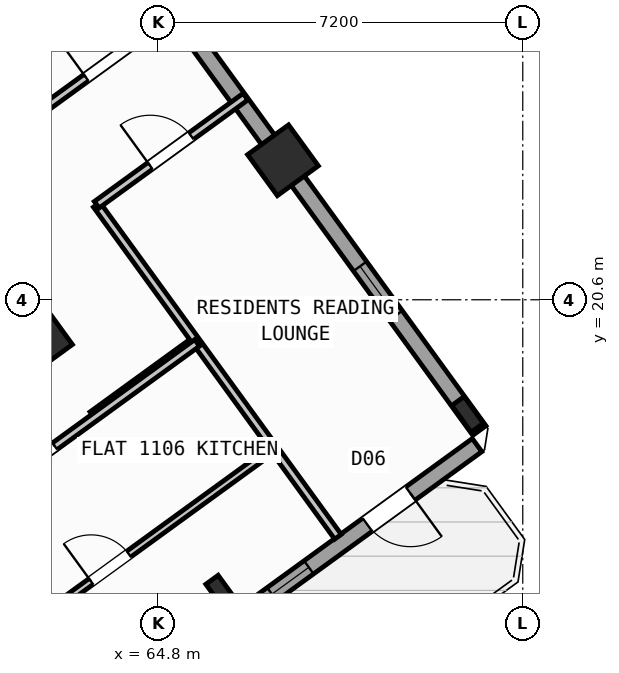
"""IFC4 building model, lengths in metres.
Left out: names, types, materials, properties, quantities, classifications, styles, units other than length and angle.
Written with IfcOpenShell. Run it as: python <this file> out.ifc"""

import sys

from ifc_helpers import new_model, si_unit, direction, frame, frame_2d, origin, origin_2d, place, context, subcontext, project, spatial, rectangle, hollow_rectangle, i_section, extrude, source, transform, mapped, element, fill, save


model = new_model("IFC4")
c1 = context("Model", 3, precision=1e-05, world=origin(), true_north=direction((0.0, 1.0)))
c2 = subcontext(c1, "Body", "Model", "MODEL_VIEW")
j1 = project(units=[si_unit("LENGTHUNIT", "METRE"), si_unit("PLANEANGLEUNIT", "RADIAN")], contexts=[c1])
p1 = place(None, origin())
s1 = spatial("IfcSite", under=j1, at=p1, CompositionType="ELEMENT")
p2 = place(p1, origin())
s2 = spatial("IfcBuilding", under=s1, at=p2, CompositionType="ELEMENT")
p3 = place(p2, frame((0.0, 0.0, 45.6)))
s3 = spatial("IfcBuildingStorey", under=s2, at=p3, CompositionType="ELEMENT", Elevation=45.6)
m1 = source(origin(), c2, "Body", "SweptSolid", [
    extrude(i_section(OverallWidth=0.3, OverallDepth=0.65, WebThickness=0.016, FlangeThickness=0.031, at=origin_2d()), origin(), (0.0, 0.0, 1.0), 3.6),
])
p4 = place(p3, frame((66.058, 14.811, 0.0), z_axis=(0.0, 0.0, 1.0), x_axis=(0.809016994375, 0.587785252292, 0.0)))
e1 = element("IfcColumn", 1, at=p4, inside=s3, PredefinedType="COLUMN", context=c2, shape_type="MappedRepresentation", body=[
    mapped(m1, transform((0.0, 0.0, 0.0), scale=1.0)),
])
m2 = source(origin(), c2, "Body", "SweptSolid", [
    extrude(hollow_rectangle(XDim=1.0, YDim=1.0, WallThickness=0.04, at=origin_2d()), origin(), (0.0, 0.0, 1.0), 3.6),
])
p5 = place(p3, frame((62.414, 19.827, 0.0), z_axis=(0.0, 0.0, 1.0), x_axis=(0.809016994375, 0.587785252292, 0.0)))
e2 = element("IfcColumn", 2, at=p5, inside=s3, PredefinedType="COLUMN", context=c2, shape_type="MappedRepresentation", body=[
    mapped(m2, transform((0.0, 0.0, 0.0), scale=1.0)),
])
p6 = place(p3, frame((70.912, 18.338, 0.0), z_axis=(0.0, 0.0, 1.0), x_axis=(0.809016994375, 0.587785252292, 0.0)))
e3 = element("IfcColumn", 3, at=p6, inside=s3, PredefinedType="COLUMN", context=c2, shape_type="MappedRepresentation", body=[
    mapped(m1, transform((0.0, 0.0, 0.0), scale=1.0)),
])
p7 = place(p3, frame((67.268, 23.354, 0.0), z_axis=(0.0, 0.0, 1.0), x_axis=(0.809016994375, 0.587785252292, 0.0)))
e4 = element("IfcColumn", 4, at=p7, inside=s3, PredefinedType="COLUMN", context=c2, shape_type="MappedRepresentation", body=[
    mapped(m2, transform((0.0, 0.0, 0.0), scale=1.0)),
])
p8 = place(p3, frame((58.455, 35.484, 0.0), z_axis=(0.0, 0.0, 1.0), x_axis=(0.587783625747, -0.809018176127, 0.0)))
e5 = element("IfcWall", 5, at=p8, inside=s3, PredefinedType="STANDARD", context=c2, shape_type="SweptSolid", body=[
    extrude(rectangle(XDim=21.587, YDim=0.32, at=frame_2d((10.794, 0.0))), origin(), (0.0, 0.0, 1.0), 2.725),
])
p9 = place(p8, frame((1.5, 0.0, 0.8)))
e6 = element("IfcOpeningElement", 6, at=p9, cuts=e5, PredefinedType="OPENING", context=c2, shape_type="SweptSolid", body=[
    extrude(rectangle(XDim=2.1, YDim=1.55, at=frame_2d((1.05, 0.775))), frame((0.0, 0.17, 0.0), z_axis=(0.0, -1.0, 0.0), x_axis=(1.0, 0.0, 0.0)), (0.0, 0.0, 1.0), 0.34),
])
p10 = place(p8, frame((5.105, 0.0, 0.85)))
e7 = element("IfcOpeningElement", 7, at=p10, cuts=e5, PredefinedType="OPENING", context=c2, shape_type="SweptSolid", body=[
    extrude(rectangle(XDim=1.5, YDim=1.5, at=frame_2d((0.75, 0.75))), frame((0.0, 0.17, 0.0), z_axis=(0.0, -1.0, 0.0), x_axis=(1.0, 0.0, 0.0)), (0.0, 0.0, 1.0), 0.34),
])
p11 = place(p8, frame((8.954, 0.0, 0.85)))
e8 = element("IfcOpeningElement", 8, at=p11, cuts=e5, PredefinedType="OPENING", context=c2, shape_type="SweptSolid", body=[
    extrude(rectangle(XDim=1.5, YDim=1.5, at=frame_2d((0.75, 0.75))), frame((0.0, 0.17, 0.0), z_axis=(0.0, -1.0, 0.0), x_axis=(1.0, 0.0, 0.0)), (0.0, 0.0, 1.0), 0.34),
])
p12 = place(p8, frame((17.581, 0.0, 0.95)))
e9 = element("IfcOpeningElement", 9, at=p12, cuts=e5, PredefinedType="OPENING", context=c2, shape_type="SweptSolid", body=[
    extrude(rectangle(XDim=1.2, YDim=1.4, at=frame_2d((0.6, 0.7))), frame((0.0, 0.17, 0.0), z_axis=(0.0, -1.0, 0.0), x_axis=(1.0, 0.0, 0.0)), (0.0, 0.0, 1.0), 0.34),
])
p13 = place(p3, frame((71.098, 17.731, 0.0), z_axis=(0.0, 0.0, 1.0), x_axis=(-0.809021120468, -0.587779573171, 0.0)))
e10 = element("IfcWall", 10, at=p13, inside=s3, PredefinedType="STANDARD", context=c2, shape_type="SweptSolid", body=[
    extrude(rectangle(XDim=17.588, YDim=0.32, at=frame_2d((8.794, 0.0))), origin(), (0.0, 0.0, 1.0), 3.35),
])
p14 = place(p13, frame((1.624, 0.0, 0.0)))
e11 = element("IfcOpeningElement", 11, at=p14, cuts=e10, PredefinedType="OPENING", context=c2, shape_type="SweptSolid", body=[
    extrude(rectangle(XDim=1.05, YDim=2.15, at=frame_2d((0.525, 1.075))), frame((0.0, 0.17, 0.0), z_axis=(0.0, -1.0, 0.0), x_axis=(1.0, 0.0, 0.0)), (0.0, 0.0, 1.0), 0.34),
])
p15 = place(p13, frame((4.104, 0.0, 1.0)))
e12 = element("IfcOpeningElement", 12, at=p15, cuts=e10, PredefinedType="OPENING", context=c2, shape_type="SweptSolid", body=[
    extrude(rectangle(XDim=0.9, YDim=1.25, at=frame_2d((0.45, 0.625))), frame((0.0, 0.17, 0.0), z_axis=(0.0, -1.0, 0.0), x_axis=(1.0, 0.0, 0.0)), (0.0, 0.0, 1.0), 0.34),
])
p16 = place(p13, frame((7.879, 0.0, 0.85)))
e13 = element("IfcOpeningElement", 13, at=p16, cuts=e10, PredefinedType="OPENING", context=c2, shape_type="SweptSolid", body=[
    extrude(rectangle(XDim=1.8, YDim=1.5, at=frame_2d((0.9, 0.75))), frame((0.0, 0.17, 0.0), z_axis=(0.0, -1.0, 0.0), x_axis=(1.0, 0.0, 0.0)), (0.0, 0.0, 1.0), 0.34),
])
p17 = place(p13, frame((12.849, 0.0, 0.85)))
e14 = element("IfcOpeningElement", 14, at=p17, cuts=e10, PredefinedType="OPENING", context=c2, shape_type="SweptSolid", body=[
    extrude(rectangle(XDim=1.8, YDim=1.5, at=frame_2d((0.9, 0.75))), frame((0.0, 0.17, 0.0), z_axis=(0.0, -1.0, 0.0), x_axis=(1.0, 0.0, 0.0)), (0.0, 0.0, 1.0), 0.34),
])
p18 = place(p3, frame((63.507, 18.322, 0.0), z_axis=(0.0, 0.0, 1.0), x_axis=(0.809034604122, 0.587761013791, 0.0)))
e15 = element("IfcWall", 15, at=p18, inside=s3, PredefinedType="PARTITIONING", context=c2, shape_type="SweptSolid", body=[
    extrude(rectangle(XDim=2.51, YDim=0.16, at=frame_2d((1.255, 0.0))), origin(), (0.0, 0.0, 1.0), 3.34),
])
p19 = place(p3, frame((68.353, 15.922, 0.0), z_axis=(0.0, 0.0, 1.0), x_axis=(-0.58776839458, 0.809029241952, 0.0)))
e16 = element("IfcWall", 16, at=p19, inside=s3, PredefinedType="PARTITIONING", context=c2, shape_type="SweptSolid", body=[
    extrude(rectangle(XDim=8.1, YDim=0.16, at=frame_2d((4.05, 0.0))), origin(), (0.0, 0.0, 1.0), 3.34),
])
p20 = place(p3, frame((63.592, 22.475, 0.0), z_axis=(0.0, 0.0, 1.0), x_axis=(0.809035546126, 0.58775971715, 0.0)))
e17 = element("IfcWall", 17, at=p20, inside=s3, PredefinedType="PARTITIONING", context=c2, shape_type="SweptSolid", body=[
    extrude(rectangle(XDim=3.63, YDim=0.16, at=frame_2d((1.815, 0.0))), origin(), (0.0, 0.0, 1.0), 3.34),
])
p21 = place(p20, frame((1.305, 0.0, 0.0)))
e18 = element("IfcOpeningElement", 18, at=p21, cuts=e17, PredefinedType="OPENING", context=c2, shape_type="SweptSolid", body=[
    extrude(rectangle(XDim=1.0, YDim=2.1, at=frame_2d((0.5, 1.05))), frame((0.0, 0.09, 0.0), z_axis=(0.0, -1.0, 0.0), x_axis=(1.0, 0.0, 0.0)), (0.0, 0.0, 1.0), 0.18),
])
p22 = place(p3, frame((62.328, 24.215, 0.0), z_axis=(0.0, 0.0, 1.0), x_axis=(0.809003564202, 0.587803736896, 0.0)))
e19 = element("IfcWall", 19, at=p22, inside=s3, PredefinedType="PARTITIONING", context=c2, shape_type="SweptSolid", body=[
    extrude(rectangle(XDim=3.63, YDim=0.16, at=frame_2d((1.815, 0.0))), origin(), (0.0, 0.0, 1.0), 3.34),
])
p23 = place(p22, frame((1.305, 0.0, 0.0)))
e20 = element("IfcOpeningElement", 20, at=p23, cuts=e19, PredefinedType="OPENING", context=c2, shape_type="SweptSolid", body=[
    extrude(rectangle(XDim=1.0, YDim=2.1, at=frame_2d((0.5, 1.05))), frame((0.0, 0.09, 0.0), z_axis=(0.0, -1.0, 0.0), x_axis=(1.0, 0.0, 0.0)), (0.0, 0.0, 1.0), 0.18),
])
p24 = place(p3, frame((53.705, 11.126, 0.0), z_axis=(0.0, 0.0, 1.0), x_axis=(0.809014504436, 0.587788679384, 0.0)))
e21 = element("IfcWall", 21, at=p24, inside=s3, PredefinedType="PARTITIONING", context=c2, shape_type="SweptSolid", body=[
    extrude(rectangle(XDim=14.67, YDim=0.16, at=frame_2d((7.335, 0.0))), origin(), (0.0, 0.0, 1.0), 3.34),
])
p25 = place(p24, frame((10.2, 0.0, 0.0)))
e22 = element("IfcOpeningElement", 22, at=p25, cuts=e21, PredefinedType="OPENING", context=c2, shape_type="SweptSolid", body=[
    extrude(rectangle(XDim=1.0, YDim=2.1, at=frame_2d((0.5, 1.05))), frame((0.0, 0.09, 0.0), z_axis=(0.0, -1.0, 0.0), x_axis=(1.0, 0.0, 0.0)), (0.0, 0.0, 1.0), 0.18),
])
p26 = place(p3, frame((56.249, 9.785, 0.0), z_axis=(0.0, 0.0, 1.0), x_axis=(0.809011747655, 0.587792473715, 0.0)))
e23 = element("IfcWall", 23, at=p26, inside=s3, PredefinedType="PLUMBINGWALL", context=c2, shape_type="SweptSolid", body=[
    extrude(rectangle(XDim=13.4, YDim=0.14, at=frame_2d((6.7, 0.0))), origin(), (0.0, 0.0, 1.0), 3.34),
])
p27 = place(p26, frame((8.94, 0.0, 0.0)))
e24 = element("IfcOpeningElement", 24, at=p27, cuts=e23, PredefinedType="OPENING", context=c2, shape_type="SweptSolid", body=[
    extrude(rectangle(XDim=0.92, YDim=2.08, at=frame_2d((0.46, 1.04))), frame((0.0, 0.08, 0.0), z_axis=(0.0, -1.0, 0.0), x_axis=(1.0, 0.0, 0.0)), (0.0, 0.0, 1.0), 0.16),
])
m3 = source(origin(), c2, "Body", "SweptSolid", [
    extrude(rectangle(XDim=1.05, YDim=2.15, at=frame_2d((0.525, 1.075))), frame((0.0, 0.025, 0.0), z_axis=(0.0, -1.0, 0.0), x_axis=(1.0, 0.0, 0.0)), (0.0, 0.0, 1.0), 0.05),
])
p28 = place(p14, origin())
e25 = element("IfcDoor", 25, at=p28, inside=s3, OperationType="SINGLE_SWING_LEFT", PredefinedType="DOOR", context=c2, shape_type="MappedRepresentation", body=[
    mapped(m3, transform((0.0, 0.0, 0.0), scale=1.0)),
])
fill(e11, e25)
m4 = source(origin(), c2, "Body", "SweptSolid", [
    extrude(rectangle(XDim=1.2, YDim=1.4, at=frame_2d((0.6, 0.7))), frame((0.0, 0.03, 0.0), z_axis=(0.0, -1.0, 0.0), x_axis=(1.0, 0.0, 0.0)), (0.0, 0.0, 1.0), 0.06),
])
p29 = place(p12, origin())
e26 = element("IfcWindow", 26, at=p29, inside=s3, PartitioningType="SINGLE_PANEL", PredefinedType="WINDOW", context=c2, shape_type="MappedRepresentation", body=[
    mapped(m4, transform((0.0, 0.0, 0.0), scale=1.0)),
])
fill(e9, e26)
m5 = source(origin(), c2, "Body", "SweptSolid", [
    extrude(rectangle(XDim=0.9, YDim=1.25, at=frame_2d((0.45, 0.625))), frame((0.0, 0.03, 0.0), z_axis=(0.0, -1.0, 0.0), x_axis=(1.0, 0.0, 0.0)), (0.0, 0.0, 1.0), 0.06),
])
p30 = place(p15, origin())
e27 = element("IfcWindow", 27, at=p30, inside=s3, PartitioningType="SINGLE_PANEL", PredefinedType="WINDOW", context=c2, shape_type="MappedRepresentation", body=[
    mapped(m5, transform((0.0, 0.0, 0.0), scale=1.0)),
])
fill(e12, e27)
m6 = source(origin(), c2, "Body", "SweptSolid", [
    extrude(rectangle(XDim=1.0, YDim=2.1, at=frame_2d((0.5, 1.05))), frame((0.0, 0.025, 0.0), z_axis=(0.0, -1.0, 0.0), x_axis=(1.0, 0.0, 0.0)), (0.0, 0.0, 1.0), 0.05),
])
p31 = place(p23, origin())
e28 = element("IfcDoor", 28, at=p31, inside=s3, OperationType="SINGLE_SWING_LEFT", PredefinedType="DOOR", context=c2, shape_type="MappedRepresentation", body=[
    mapped(m6, transform((0.0, 0.0, 0.0), scale=1.0)),
])
fill(e20, e28)
p32 = place(p21, origin())
e29 = element("IfcDoor", 29, at=p32, inside=s3, OperationType="SINGLE_SWING_LEFT", PredefinedType="DOOR", context=c2, shape_type="MappedRepresentation", body=[
    mapped(m6, transform((0.0, 0.0, 0.0), scale=1.0)),
])
fill(e18, e29)
p33 = place(p25, origin())
e30 = element("IfcDoor", 30, at=p33, inside=s3, OperationType="SINGLE_SWING_RIGHT", PredefinedType="DOOR", context=c2, shape_type="MappedRepresentation", body=[
    mapped(m6, transform((0.0, 0.0, 0.0), scale=1.0)),
])
fill(e22, e30)
m7 = source(origin(), c2, "Body", "SweptSolid", [
    extrude(rectangle(XDim=0.92, YDim=2.08, at=frame_2d((0.46, 1.04))), frame((0.0, 0.025, 0.0), z_axis=(0.0, -1.0, 0.0), x_axis=(1.0, 0.0, 0.0)), (0.0, 0.0, 1.0), 0.05),
])
p34 = place(p27, origin())
e31 = element("IfcDoor", 31, at=p34, inside=s3, OperationType="SINGLE_SWING_LEFT", PredefinedType="DOOR", context=c2, shape_type="MappedRepresentation", body=[
    mapped(m7, transform((0.0, 0.0, 0.0), scale=1.0)),
])
fill(e24, e31)
save(model, sys.argv[1])
